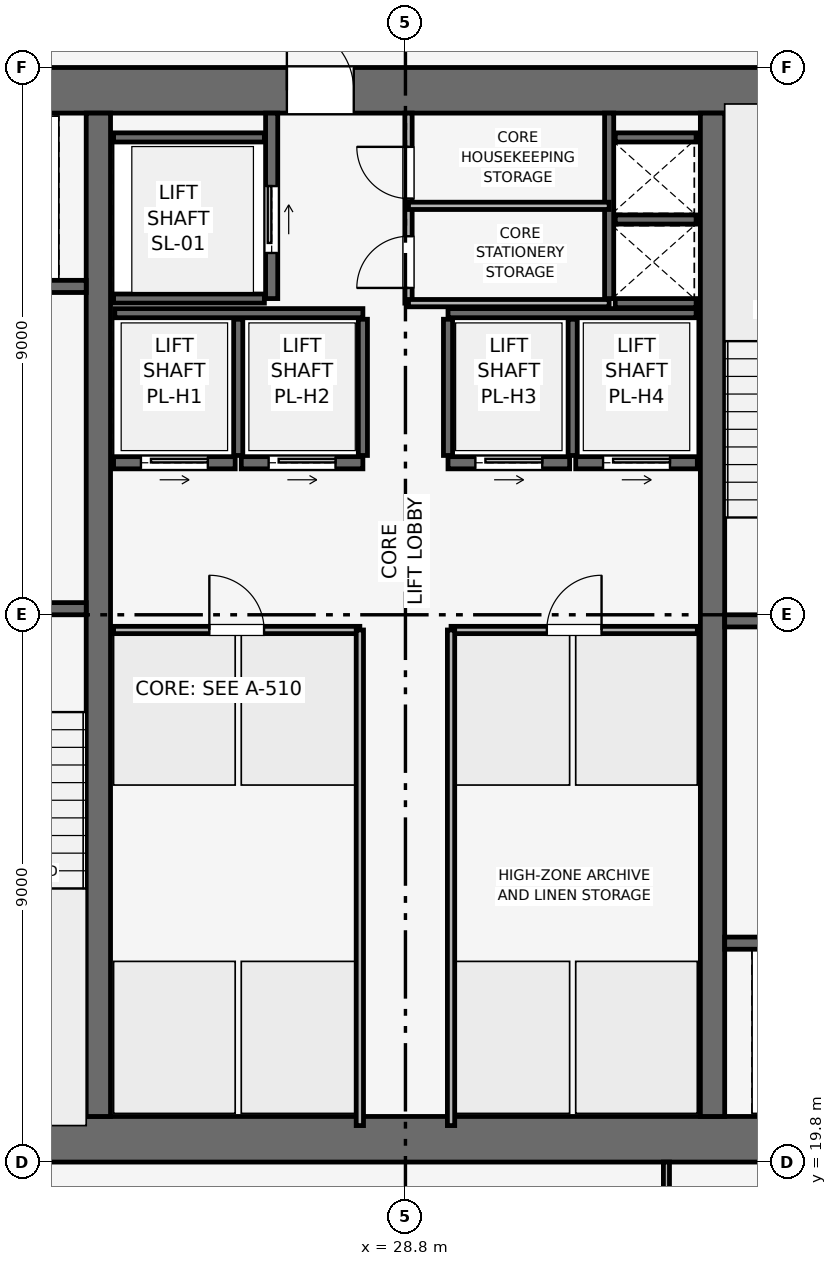
"""IFC4 building model, lengths in metres.
Left out: names, types, materials, properties, quantities, classifications, styles, units other than length and angle.
Written with IfcOpenShell. Run it as: python <this file> out.ifc"""

import sys

from ifc_helpers import new_model, si_unit, direction, frame, frame_2d, origin, place, context, subcontext, project, spatial, rectangle, extrude, element, fill, save


model = new_model("IFC4")
c1 = context("Model", 3, precision=1e-05, world=origin(), true_north=direction((0.0, 1.0)))
c2 = subcontext(c1, "Body", "Model", "MODEL_VIEW")
j1 = project(units=[si_unit("LENGTHUNIT", "METRE"), si_unit("PLANEANGLEUNIT", "RADIAN")], contexts=[c1])
p1 = place(None, origin())
s1 = spatial("IfcSite", under=j1, at=p1, CompositionType="ELEMENT")
p2 = place(p1, origin())
s2 = spatial("IfcBuilding", under=s1, at=p2, CompositionType="ELEMENT")
p3 = place(p2, frame((0.0, 0.0, 280.35)))
s3 = spatial("IfcBuildingStorey", under=s2, at=p3, CompositionType="ELEMENT", Elevation=280.35)
p4 = place(p3, frame((19.8, 20.175, 0.0), z_axis=(0.0, 0.0, 1.0), x_axis=(1.0, 0.0, 0.0)))
e1 = element("IfcWall", 1, at=p4, inside=s3, PredefinedType="SHEAR", context=c2, shape_type="SweptSolid", body=[
    extrude(rectangle(XDim=18.0, YDim=0.75, at=frame_2d((9.0, 0.0))), origin(), (0.0, 0.0, 1.0), 3.75),
])
p5 = place(p3, frame((19.8, 37.425, 0.0), z_axis=(0.0, 0.0, 1.0), x_axis=(1.0, 0.0, 0.0)))
e2 = element("IfcWall", 2, at=p5, inside=s3, PredefinedType="SHEAR", context=c2, shape_type="SweptSolid", body=[
    extrude(rectangle(XDim=18.0, YDim=0.75, at=frame_2d((9.0, 0.0))), origin(), (0.0, 0.0, 1.0), 3.75),
])
p6 = place(p5, frame((7.05, 0.0, 0.0)))
e3 = element("IfcOpeningElement", 3, at=p6, cuts=e2, PredefinedType="OPENING", context=c2, shape_type="SweptSolid", body=[
    extrude(rectangle(XDim=1.1, YDim=2.15, at=frame_2d((0.55, 1.075))), frame((0.0, 0.385, 0.0), z_axis=(0.0, -1.0, 0.0), x_axis=(1.0, 0.0, 0.0)), (0.0, 0.0, 1.0), 0.77),
])
for number, where, z_axis, x_axis in (
    (4, (23.75, 20.55, 0.0), (0.0, 0.0, 1.0), (0.0, 1.0, 0.0)),
    (5, (33.85, 20.55, 0.0), (0.0, 0.0, 1.0), (0.0, 1.0, 0.0)),
):
    element("IfcWall", number, at=place(p3, frame(where, z_axis=z_axis, x_axis=x_axis)), inside=s3, PredefinedType="SHEAR", context=c2, shape_type="SweptSolid", body=[
        extrude(rectangle(XDim=16.5, YDim=0.4, at=frame_2d((8.25, 0.0))), origin(), (0.0, 0.0, 1.0), 3.75),
    ])
p7 = place(p3, frame((20.4, 28.9, 0.0), z_axis=(0.0, 0.0, 1.0), x_axis=(1.0, 0.0, 0.0)))
e6 = element("IfcWall", 6, at=p7, inside=s3, PredefinedType="SHEAR", context=c2, shape_type="SweptSolid", body=[
    extrude(rectangle(XDim=3.15, YDim=0.2, at=frame_2d((1.575, 0.0))), origin(), (0.0, 0.0, 1.0), 3.39),
])
p8 = place(p7, frame((0.8, 0.0, 0.0)))
e7 = element("IfcOpeningElement", 7, at=p8, cuts=e6, PredefinedType="OPENING", context=c2, shape_type="SweptSolid", body=[
    extrude(rectangle(XDim=1.0, YDim=2.1, at=frame_2d((0.5, 1.05))), frame((0.0, 0.11, 0.0), z_axis=(0.0, -1.0, 0.0), x_axis=(1.0, 0.0, 0.0)), (0.0, 0.0, 1.0), 0.22),
])
p9 = place(p3, frame((34.05, 28.7, 0.0), z_axis=(0.0, 0.0, 1.0), x_axis=(1.0, 0.0, 0.0)))
e8 = element("IfcWall", 8, at=p9, inside=s3, PredefinedType="SHEAR", context=c2, shape_type="SweptSolid", body=[
    extrude(rectangle(XDim=3.15, YDim=0.2, at=frame_2d((1.575, 0.0))), origin(), (0.0, 0.0, 1.0), 3.39),
])
p10 = place(p9, frame((0.8, 0.0, 0.0)))
e9 = element("IfcOpeningElement", 9, at=p10, cuts=e8, PredefinedType="OPENING", context=c2, shape_type="SweptSolid", body=[
    extrude(rectangle(XDim=1.0, YDim=2.1, at=frame_2d((0.5, 1.05))), frame((0.0, 0.11, 0.0), z_axis=(0.0, -1.0, 0.0), x_axis=(1.0, 0.0, 0.0)), (0.0, 0.0, 1.0), 0.22),
])
p11 = place(p3, frame((32.15, 34.0, 0.0), z_axis=(0.0, 0.0, 1.0), x_axis=(0.0, 1.0, 0.0)))
e10 = element("IfcWall", 10, at=p11, inside=s3, PredefinedType="SHEAR", context=c2, shape_type="SweptSolid", body=[
    extrude(rectangle(XDim=3.05, YDim=0.15, at=frame_2d((1.525, 0.0))), origin(), (0.0, 0.0, 1.0), 3.39),
])
for number, where, z_axis, x_axis in (
    (11, (32.25, 33.925, 0.0), (0.0, 0.0, 1.0), (1.0, 0.0, 0.0)),
    (12, (32.25, 35.3, 0.0), (0.0, 0.0, 1.0), (1.0, 0.0, 0.0)),
):
    element("IfcWall", number, at=place(p3, frame(where, z_axis=z_axis, x_axis=x_axis)), inside=s3, PredefinedType="SHEAR", context=c2, shape_type="SweptSolid", body=[
        extrude(rectangle(XDim=1.33, YDim=0.15, at=frame_2d((0.665, 0.0))), origin(), (0.0, 0.0, 1.0), 3.39),
    ])
p12 = place(p3, frame((20.5, 34.2, 0.0), z_axis=(0.0, 0.0, 1.0), x_axis=(1.0, 0.0, 0.0)))
e13 = element("IfcWall", 13, at=p12, inside=s3, PredefinedType="SHEAR", context=c2, shape_type="SweptSolid", body=[
    extrude(rectangle(XDim=3.05, YDim=0.2, at=frame_2d((1.525, 0.0))), origin(), (0.0, 0.0, 1.0), 3.39),
])
p13 = place(p12, frame((0.75, 0.0, 0.0)))
e14 = element("IfcOpeningElement", 14, at=p13, cuts=e13, PredefinedType="OPENING", context=c2, shape_type="SweptSolid", body=[
    extrude(rectangle(XDim=1.1, YDim=2.15, at=frame_2d((0.55, 1.075))), frame((0.0, 0.11, 0.0), z_axis=(0.0, -1.0, 0.0), x_axis=(1.0, 0.0, 0.0)), (0.0, 0.0, 1.0), 0.22),
])
p14 = place(p3, frame((34.05, 23.4, 0.0), z_axis=(0.0, 0.0, 1.0), x_axis=(1.0, 0.0, 0.0)))
e15 = element("IfcWall", 15, at=p14, inside=s3, PredefinedType="SHEAR", context=c2, shape_type="SweptSolid", body=[
    extrude(rectangle(XDim=3.05, YDim=0.2, at=frame_2d((1.525, 0.0))), origin(), (0.0, 0.0, 1.0), 3.39),
])
p15 = place(p14, frame((1.2, 0.0, 0.0)))
e16 = element("IfcOpeningElement", 16, at=p15, cuts=e15, PredefinedType="OPENING", context=c2, shape_type="SweptSolid", body=[
    extrude(rectangle(XDim=1.1, YDim=2.15, at=frame_2d((0.55, 1.075))), frame((0.0, 0.11, 0.0), z_axis=(0.0, -1.0, 0.0), x_axis=(1.0, 0.0, 0.0)), (0.0, 0.0, 1.0), 0.22),
])
p16 = place(p3, frame((26.6, 34.0, 0.0), z_axis=(0.0, 0.0, 1.0), x_axis=(0.0, 1.0, 0.0)))
e17 = element("IfcWall", 17, at=p16, inside=s3, PredefinedType="SHEAR", context=c2, shape_type="SweptSolid", body=[
    extrude(rectangle(XDim=3.05, YDim=0.2, at=frame_2d((1.525, 0.0))), origin(), (0.0, 0.0, 1.0), 3.39),
])
p17 = place(p16, frame((0.75, 0.0, 0.0)))
e18 = element("IfcOpeningElement", 18, at=p17, cuts=e17, PredefinedType="OPENING", context=c2, shape_type="SweptSolid", body=[
    extrude(rectangle(XDim=1.1, YDim=2.15, at=frame_2d((0.55, 1.075))), frame((0.0, 0.11, 0.0), z_axis=(0.0, -1.0, 0.0), x_axis=(1.0, 0.0, 0.0)), (0.0, 0.0, 1.0), 0.22),
])
for number, where, z_axis, x_axis in (
    (19, (24.0, 34.0, 0.0), (0.0, 0.0, 1.0), (1.0, 0.0, 0.0)),
    (20, (24.0, 36.65, 0.0), (0.0, 0.0, 1.0), (1.0, 0.0, 0.0)),
):
    element("IfcWall", number, at=place(p3, frame(where, z_axis=z_axis, x_axis=x_axis)), inside=s3, PredefinedType="SHEAR", context=c2, shape_type="SweptSolid", body=[
        extrude(rectangle(XDim=2.48, YDim=0.15, at=frame_2d((1.24, 0.0))), origin(), (0.0, 0.0, 1.0), 3.39),
    ])
p18 = place(p3, frame((24.0, 31.3, 0.0), z_axis=(0.0, 0.0, 1.0), x_axis=(1.0, 0.0, 0.0)))
e21 = element("IfcWall", 21, at=p18, inside=s3, PredefinedType="SHEAR", context=c2, shape_type="SweptSolid", body=[
    extrude(rectangle(XDim=2.0, YDim=0.2, at=frame_2d((1.0, 0.0))), origin(), (0.0, 0.0, 1.0), 3.39),
])
p19 = place(p18, frame((0.45, 0.0, 0.0)))
e22 = element("IfcOpeningElement", 22, at=p19, cuts=e21, PredefinedType="OPENING", context=c2, shape_type="SweptSolid", body=[
    extrude(rectangle(XDim=1.1, YDim=2.15, at=frame_2d((0.55, 1.075))), frame((0.0, 0.11, 0.0), z_axis=(0.0, -1.0, 0.0), x_axis=(1.0, 0.0, 0.0)), (0.0, 0.0, 1.0), 0.22),
])
p20 = place(p3, frame((26.1, 31.3, 0.0), z_axis=(0.0, 0.0, 1.0), x_axis=(1.0, 0.0, 0.0)))
e23 = element("IfcWall", 23, at=p20, inside=s3, PredefinedType="SHEAR", context=c2, shape_type="SweptSolid", body=[
    extrude(rectangle(XDim=2.0, YDim=0.2, at=frame_2d((1.0, 0.0))), origin(), (0.0, 0.0, 1.0), 3.39),
])
p21 = place(p20, frame((0.45, 0.0, 0.0)))
e24 = element("IfcOpeningElement", 24, at=p21, cuts=e23, PredefinedType="OPENING", context=c2, shape_type="SweptSolid", body=[
    extrude(rectangle(XDim=1.1, YDim=2.15, at=frame_2d((0.55, 1.075))), frame((0.0, 0.11, 0.0), z_axis=(0.0, -1.0, 0.0), x_axis=(1.0, 0.0, 0.0)), (0.0, 0.0, 1.0), 0.22),
])
p22 = place(p3, frame((29.5, 31.3, 0.0), z_axis=(0.0, 0.0, 1.0), x_axis=(1.0, 0.0, 0.0)))
e25 = element("IfcWall", 25, at=p22, inside=s3, PredefinedType="SHEAR", context=c2, shape_type="SweptSolid", body=[
    extrude(rectangle(XDim=2.0, YDim=0.2, at=frame_2d((1.0, 0.0))), origin(), (0.0, 0.0, 1.0), 3.39),
])
p23 = place(p22, frame((0.45, 0.0, 0.0)))
e26 = element("IfcOpeningElement", 26, at=p23, cuts=e25, PredefinedType="OPENING", context=c2, shape_type="SweptSolid", body=[
    extrude(rectangle(XDim=1.1, YDim=2.15, at=frame_2d((0.55, 1.075))), frame((0.0, 0.11, 0.0), z_axis=(0.0, -1.0, 0.0), x_axis=(1.0, 0.0, 0.0)), (0.0, 0.0, 1.0), 0.22),
])
p24 = place(p3, frame((31.6, 31.3, 0.0), z_axis=(0.0, 0.0, 1.0), x_axis=(1.0, 0.0, 0.0)))
e27 = element("IfcWall", 27, at=p24, inside=s3, PredefinedType="SHEAR", context=c2, shape_type="SweptSolid", body=[
    extrude(rectangle(XDim=2.0, YDim=0.2, at=frame_2d((1.0, 0.0))), origin(), (0.0, 0.0, 1.0), 3.39),
])
p25 = place(p24, frame((0.45, 0.0, 0.0)))
e28 = element("IfcOpeningElement", 28, at=p25, cuts=e27, PredefinedType="OPENING", context=c2, shape_type="SweptSolid", body=[
    extrude(rectangle(XDim=1.1, YDim=2.15, at=frame_2d((0.55, 1.075))), frame((0.0, 0.11, 0.0), z_axis=(0.0, -1.0, 0.0), x_axis=(1.0, 0.0, 0.0)), (0.0, 0.0, 1.0), 0.22),
])
p26 = place(p3, frame((32.25, 36.65, 0.0), z_axis=(0.0, 0.0, 1.0), x_axis=(1.0, 0.0, 0.0)))
e29 = element("IfcWall", 29, at=p26, inside=s3, PredefinedType="SHEAR", context=c2, shape_type="SweptSolid", body=[
    extrude(rectangle(XDim=1.33, YDim=0.15, at=frame_2d((0.665, 0.0))), origin(), (0.0, 0.0, 1.0), 3.39),
])
for number, where, z_axis, x_axis in (
    (30, (24.02, 33.76, 0.0), (0.0, 0.0, 1.0), (1.0, 0.0, 0.0)),
    (31, (29.5, 33.76, 0.0), (0.0, 0.0, 1.0), (1.0, 0.0, 0.0)),
):
    element("IfcWall", number, at=place(p3, frame(where, z_axis=z_axis, x_axis=x_axis)), inside=s3, PredefinedType="SHEAR", context=c2, shape_type="SweptSolid", body=[
        extrude(rectangle(XDim=4.08, YDim=0.15, at=frame_2d((2.04, 0.0))), origin(), (0.0, 0.0, 1.0), 3.39),
    ])
for number, where, z_axis, x_axis in (
    (32, (26.05, 31.42, 0.0), (0.0, 0.0, 1.0), (0.0, 1.0, 0.0)),
    (33, (28.1, 31.42, 0.0), (0.0, 0.0, 1.0), (0.0, 1.0, 0.0)),
    (34, (29.5, 31.42, 0.0), (0.0, 0.0, 1.0), (0.0, 1.0, 0.0)),
    (35, (31.55, 31.42, 0.0), (0.0, 0.0, 1.0), (0.0, 1.0, 0.0)),
):
    element("IfcWall", number, at=place(p3, frame(where, z_axis=z_axis, x_axis=x_axis)), inside=s3, PredefinedType="SHEAR", context=c2, shape_type="SweptSolid", body=[
        extrude(rectangle(XDim=2.24, YDim=0.15, at=frame_2d((1.12, 0.0))), origin(), (0.0, 0.0, 1.0), 3.39),
    ])
p27 = place(p3, frame((28.85, 33.925, 0.0), z_axis=(0.0, 0.0, 1.0), x_axis=(0.0, 1.0, 0.0)))
e36 = element("IfcWall", 36, at=p27, inside=s3, PredefinedType="PARTITIONING", context=c2, shape_type="SweptSolid", body=[
    extrude(rectangle(XDim=3.125, YDim=0.12, at=frame_2d((1.562, 0.0))), origin(), (0.0, 0.0, 1.0), 3.39),
])
p28 = place(p27, frame((0.25, 0.0, 0.0)))
e37 = element("IfcOpeningElement", 37, at=p28, cuts=e36, PredefinedType="OPENING", context=c2, shape_type="SweptSolid", body=[
    extrude(rectangle(XDim=0.85, YDim=2.1, at=frame_2d((0.425, 1.05))), frame((0.0, 0.07, 0.0), z_axis=(0.0, -1.0, 0.0), x_axis=(1.0, 0.0, 0.0)), (0.0, 0.0, 1.0), 0.14),
])
p29 = place(p27, frame((1.72, 0.0, 0.0)))
e38 = element("IfcOpeningElement", 38, at=p29, cuts=e36, PredefinedType="OPENING", context=c2, shape_type="SweptSolid", body=[
    extrude(rectangle(XDim=0.85, YDim=2.1, at=frame_2d((0.425, 1.05))), frame((0.0, 0.07, 0.0), z_axis=(0.0, -1.0, 0.0), x_axis=(1.0, 0.0, 0.0)), (0.0, 0.0, 1.0), 0.14),
])
for number, where, z_axis, x_axis in (
    (39, (28.85, 35.525, 0.0), (0.0, 0.0, 1.0), (1.0, 0.0, 0.0)),
    (40, (28.85, 33.925, 0.0), (0.0, 0.0, 1.0), (1.0, 0.0, 0.0)),
):
    element("IfcWall", number, at=place(p3, frame(where, z_axis=z_axis, x_axis=x_axis)), inside=s3, PredefinedType="PARTITIONING", context=c2, shape_type="SweptSolid", body=[
        extrude(rectangle(XDim=3.3, YDim=0.12, at=frame_2d((1.65, 0.0))), origin(), (0.0, 0.0, 1.0), 3.39),
    ])
p30 = place(p3, frame((24.0, 28.55, 0.0), z_axis=(0.0, 0.0, 1.0), x_axis=(1.0, 0.0, 0.0)))
e41 = element("IfcWall", 41, at=p30, inside=s3, PredefinedType="PARTITIONING", context=c2, shape_type="SweptSolid", body=[
    extrude(rectangle(XDim=4.05, YDim=0.12, at=frame_2d((2.025, 0.0))), origin(), (0.0, 0.0, 1.0), 3.39),
])
p31 = place(p30, frame((1.575, 0.0, 0.0)))
e42 = element("IfcOpeningElement", 42, at=p31, cuts=e41, PredefinedType="OPENING", context=c2, shape_type="SweptSolid", body=[
    extrude(rectangle(XDim=0.9, YDim=2.1, at=frame_2d((0.45, 1.05))), frame((0.0, 0.07, 0.0), z_axis=(0.0, -1.0, 0.0), x_axis=(1.0, 0.0, 0.0)), (0.0, 0.0, 1.0), 0.14),
])
p32 = place(p3, frame((28.05, 20.4, 0.0), z_axis=(0.0, 0.0, 1.0), x_axis=(0.0, 1.0, 0.0)))
e43 = element("IfcWall", 43, at=p32, inside=s3, PredefinedType="PARTITIONING", context=c2, shape_type="SweptSolid", body=[
    extrude(rectangle(XDim=8.15, YDim=0.12, at=frame_2d((4.075, 0.0))), origin(), (0.0, 0.0, 1.0), 3.39),
])
p33 = place(p3, frame((29.55, 28.55, 0.0), z_axis=(0.0, 0.0, 1.0), x_axis=(1.0, 0.0, 0.0)))
e44 = element("IfcWall", 44, at=p33, inside=s3, PredefinedType="PARTITIONING", context=c2, shape_type="SweptSolid", body=[
    extrude(rectangle(XDim=4.05, YDim=0.12, at=frame_2d((2.025, 0.0))), origin(), (0.0, 0.0, 1.0), 3.39),
])
p34 = place(p33, frame((1.575, 0.0, 0.0)))
e45 = element("IfcOpeningElement", 45, at=p34, cuts=e44, PredefinedType="OPENING", context=c2, shape_type="SweptSolid", body=[
    extrude(rectangle(XDim=0.9, YDim=2.1, at=frame_2d((0.45, 1.05))), frame((0.0, 0.07, 0.0), z_axis=(0.0, -1.0, 0.0), x_axis=(1.0, 0.0, 0.0)), (0.0, 0.0, 1.0), 0.14),
])
p35 = place(p3, frame((29.55, 20.4, 0.0), z_axis=(0.0, 0.0, 1.0), x_axis=(0.0, 1.0, 0.0)))
e46 = element("IfcWall", 46, at=p35, inside=s3, PredefinedType="PARTITIONING", context=c2, shape_type="SweptSolid", body=[
    extrude(rectangle(XDim=8.15, YDim=0.12, at=frame_2d((4.075, 0.0))), origin(), (0.0, 0.0, 1.0), 3.39),
])
p36 = place(p3, frame((33.092, 4.03, 0.0), z_axis=(0.0, 0.0, 1.0), x_axis=(0.0, 1.0, 0.0)))
e47 = element("IfcWall", 47, at=p36, inside=s3, PredefinedType="MOVABLE", context=c2, shape_type="SweptSolid", body=[
    extrude(rectangle(XDim=15.77, YDim=0.1, at=frame_2d((7.885, 0.0))), origin(), (0.0, 0.0, 1.0), 2.975),
])
p37 = place(p36, frame((13.37, 0.0, 0.0)))
e48 = element("IfcOpeningElement", 48, at=p37, cuts=e47, PredefinedType="OPENING", context=c2, shape_type="SweptSolid", body=[
    extrude(rectangle(XDim=0.9, YDim=2.1, at=frame_2d((0.45, 1.05))), frame((0.0, 0.06, 0.0), z_axis=(0.0, -1.0, 0.0), x_axis=(1.0, 0.0, 0.0)), (0.0, 0.0, 1.0), 0.12),
])
p38 = place(p17, origin())
e49 = element("IfcDoor", 49, at=p38, inside=s3, OperationType="SLIDING_TO_RIGHT", PredefinedType="DOOR", context=c2, shape_type="SweptSolid", body=[
    extrude(rectangle(XDim=1.1, YDim=2.15, at=frame_2d((0.55, 1.075))), frame((0.0, 0.025, 0.0), z_axis=(0.0, -1.0, 0.0), x_axis=(1.0, 0.0, 0.0)), (0.0, 0.0, 1.0), 0.05),
])
fill(e18, e49)
p39 = place(p19, origin())
e50 = element("IfcDoor", 50, at=p39, inside=s3, OperationType="SLIDING_TO_RIGHT", PredefinedType="DOOR", context=c2, shape_type="SweptSolid", body=[
    extrude(rectangle(XDim=1.1, YDim=2.15, at=frame_2d((0.55, 1.075))), frame((0.0, 0.025, 0.0), z_axis=(0.0, -1.0, 0.0), x_axis=(1.0, 0.0, 0.0)), (0.0, 0.0, 1.0), 0.05),
])
fill(e22, e50)
p40 = place(p21, origin())
e51 = element("IfcDoor", 51, at=p40, inside=s3, OperationType="SLIDING_TO_RIGHT", PredefinedType="DOOR", context=c2, shape_type="SweptSolid", body=[
    extrude(rectangle(XDim=1.1, YDim=2.15, at=frame_2d((0.55, 1.075))), frame((0.0, 0.025, 0.0), z_axis=(0.0, -1.0, 0.0), x_axis=(1.0, 0.0, 0.0)), (0.0, 0.0, 1.0), 0.05),
])
fill(e24, e51)
p41 = place(p23, origin())
e52 = element("IfcDoor", 52, at=p41, inside=s3, OperationType="SLIDING_TO_RIGHT", PredefinedType="DOOR", context=c2, shape_type="SweptSolid", body=[
    extrude(rectangle(XDim=1.1, YDim=2.15, at=frame_2d((0.55, 1.075))), frame((0.0, 0.025, 0.0), z_axis=(0.0, -1.0, 0.0), x_axis=(1.0, 0.0, 0.0)), (0.0, 0.0, 1.0), 0.05),
])
fill(e26, e52)
p42 = place(p25, origin())
e53 = element("IfcDoor", 53, at=p42, inside=s3, OperationType="SLIDING_TO_RIGHT", PredefinedType="DOOR", context=c2, shape_type="SweptSolid", body=[
    extrude(rectangle(XDim=1.1, YDim=2.15, at=frame_2d((0.55, 1.075))), frame((0.0, 0.025, 0.0), z_axis=(0.0, -1.0, 0.0), x_axis=(1.0, 0.0, 0.0)), (0.0, 0.0, 1.0), 0.05),
])
fill(e28, e53)
p43 = place(p28, origin())
e54 = element("IfcDoor", 54, at=p43, inside=s3, OperationType="SINGLE_SWING_LEFT", PredefinedType="DOOR", context=c2, shape_type="SweptSolid", body=[
    extrude(rectangle(XDim=0.85, YDim=2.1, at=frame_2d((0.425, 1.05))), frame((0.0, 0.025, 0.0), z_axis=(0.0, -1.0, 0.0), x_axis=(1.0, 0.0, 0.0)), (0.0, 0.0, 1.0), 0.05),
])
fill(e37, e54)
p44 = place(p29, origin())
e55 = element("IfcDoor", 55, at=p44, inside=s3, OperationType="SINGLE_SWING_RIGHT", PredefinedType="DOOR", context=c2, shape_type="SweptSolid", body=[
    extrude(rectangle(XDim=0.85, YDim=2.1, at=frame_2d((0.425, 1.05))), frame((0.0, 0.025, 0.0), z_axis=(0.0, -1.0, 0.0), x_axis=(1.0, 0.0, 0.0)), (0.0, 0.0, 1.0), 0.05),
])
fill(e38, e55)
p45 = place(p31, origin())
e56 = element("IfcDoor", 56, at=p45, inside=s3, OperationType="SINGLE_SWING_LEFT", PredefinedType="DOOR", context=c2, shape_type="SweptSolid", body=[
    extrude(rectangle(XDim=0.9, YDim=2.1, at=frame_2d((0.45, 1.05))), frame((0.0, 0.025, 0.0), z_axis=(0.0, -1.0, 0.0), x_axis=(1.0, 0.0, 0.0)), (0.0, 0.0, 1.0), 0.05),
])
fill(e42, e56)
p46 = place(p34, origin())
e57 = element("IfcDoor", 57, at=p46, inside=s3, OperationType="SINGLE_SWING_RIGHT", PredefinedType="DOOR", context=c2, shape_type="SweptSolid", body=[
    extrude(rectangle(XDim=0.9, YDim=2.1, at=frame_2d((0.45, 1.05))), frame((0.0, 0.025, 0.0), z_axis=(0.0, -1.0, 0.0), x_axis=(1.0, 0.0, 0.0)), (0.0, 0.0, 1.0), 0.05),
])
fill(e45, e57)
p47 = place(p6, origin())
e58 = element("IfcDoor", 58, at=p47, inside=s3, OperationType="SINGLE_SWING_LEFT", PredefinedType="DOOR", context=c2, shape_type="SweptSolid", body=[
    extrude(rectangle(XDim=1.1, YDim=2.15, at=frame_2d((0.55, 1.075))), frame((0.0, 0.025, 0.0), z_axis=(0.0, -1.0, 0.0), x_axis=(1.0, 0.0, 0.0)), (0.0, 0.0, 1.0), 0.05),
])
fill(e3, e58)
save(model, sys.argv[1])
